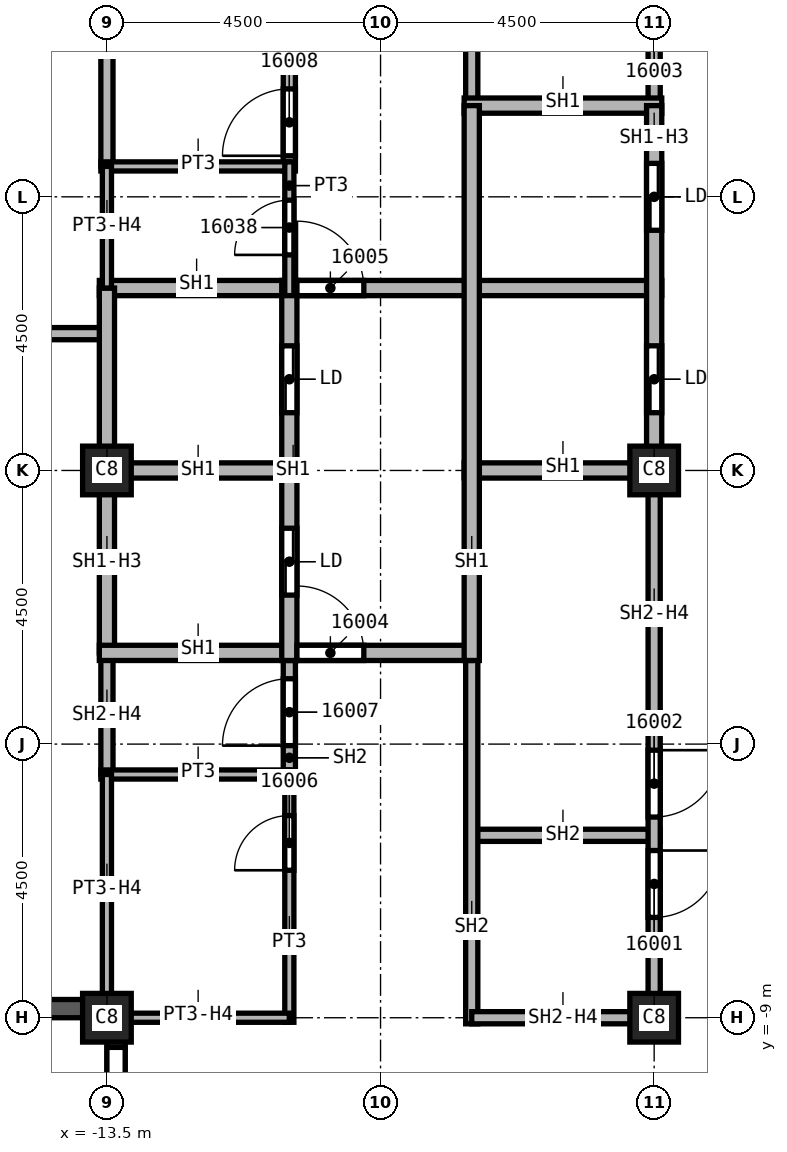
"""IFC4 building model, lengths in metres.
Left out: names, types, materials, properties, quantities, classifications, styles, units other than length and angle.
Written with IfcOpenShell. Run it as: python <this file> out.ifc"""

import sys

from ifc_helpers import new_model, si_unit, direction, frame, frame_2d, origin, origin_2d, place, context, subcontext, project, spatial, rectangle, extrude, element, fill, save


model = new_model("IFC4")
c1 = context("Model", 3, precision=1e-05, world=origin(), true_north=direction((0.0, 1.0)))
c2 = subcontext(c1, "Body", "Model", "MODEL_VIEW")
j1 = project(units=[si_unit("LENGTHUNIT", "METRE"), si_unit("PLANEANGLEUNIT", "RADIAN")], contexts=[c1])
p1 = place(None, origin())
s1 = spatial("IfcSite", under=j1, at=p1, CompositionType="ELEMENT")
p2 = place(p1, origin())
s2 = spatial("IfcBuilding", under=s1, at=p2, CompositionType="ELEMENT")
p3 = place(p2, frame((0.0, 0.0, 242.0)))
s3 = spatial("IfcBuildingStorey", under=s2, at=p3, CompositionType="ELEMENT", Elevation=242.0)
for number, where, z_axis, x_axis in (
    (1, (-4.5, 0.0, 0.0), (0.0, 0.0, 1.0), (1.0, 0.0, 0.0)),
    (2, (-4.5, -9.0, 0.0), (0.0, 0.0, 1.0), (1.0, 0.0, 0.0)),
    (3, (-13.5, 0.0, 0.0), (0.0, 0.0, 1.0), (1.0, 0.0, 0.0)),
    (4, (-13.5, -9.0, 0.0), (0.0, 0.0, 1.0), (1.0, 0.0, 0.0)),
):
    element("IfcColumn", number, at=place(p3, frame(where, z_axis=z_axis, x_axis=x_axis)), inside=s3, PredefinedType="COLUMN", context=c2, shape_type="SweptSolid", body=[
        extrude(rectangle(XDim=0.8, YDim=0.8, at=origin_2d()), origin(), (0.0, 0.0, 1.0), 3.72),
    ])
p4 = place(p3, frame((-13.35, -9.025, 0.0), z_axis=(0.0, 0.0, 1.0), x_axis=(0.0, -1.0, 0.0)))
e5 = element("IfcWall", 5, at=p4, inside=s3, PredefinedType="SOLIDWALL", context=c2, shape_type="SweptSolid", body=[
    extrude(rectangle(XDim=8.525, YDim=0.3, at=frame_2d((4.263, 0.0))), origin(), (0.0, 0.0, 1.0), 3.12),
])
p5 = place(p4, frame((0.462, 0.0, 0.8)))
e6 = element("IfcOpeningElement", 6, at=p5, cuts=e5, PredefinedType="OPENING", context=c2, shape_type="SweptSolid", body=[
    extrude(rectangle(XDim=2.4, YDim=1.95, at=frame_2d((1.2, 0.975))), frame((0.0, 0.15, 0.0), z_axis=(0.0, -1.0, 0.0), x_axis=(1.0, 0.0, 0.0)), (0.0, 0.0, 1.0), 0.3),
])
p6 = place(p4, frame((4.538, 0.0, 0.8)))
e7 = element("IfcOpeningElement", 7, at=p6, cuts=e5, PredefinedType="OPENING", context=c2, shape_type="SweptSolid", body=[
    extrude(rectangle(XDim=2.4, YDim=1.95, at=frame_2d((1.2, 0.975))), frame((0.0, 0.15, 0.0), z_axis=(0.0, -1.0, 0.0), x_axis=(1.0, 0.0, 0.0)), (0.0, 0.0, 1.0), 0.3),
])
p7 = place(p3, frame((-22.05, -8.85, 0.0), z_axis=(0.0, 0.0, 1.0), x_axis=(1.0, 0.0, 0.0)))
e8 = element("IfcWall", 8, at=p7, inside=s3, PredefinedType="SOLIDWALL", context=c2, shape_type="SweptSolid", body=[
    extrude(rectangle(XDim=8.525, YDim=0.3, at=frame_2d((4.263, 0.0))), origin(), (0.0, 0.0, 1.0), 3.12),
])
p8 = place(p7, frame((4.913, 0.0, 0.8)))
e9 = element("IfcOpeningElement", 9, at=p8, cuts=e8, PredefinedType="OPENING", context=c2, shape_type="SweptSolid", body=[
    extrude(rectangle(XDim=2.4, YDim=1.95, at=frame_2d((1.2, 0.975))), frame((0.0, 0.15, 0.0), z_axis=(0.0, -1.0, 0.0), x_axis=(1.0, 0.0, 0.0)), (0.0, 0.0, 1.0), 0.3),
])
p9 = place(p7, frame((0.894, 0.0, 0.8)))
e10 = element("IfcOpeningElement", 10, at=p9, cuts=e8, PredefinedType="OPENING", context=c2, shape_type="SweptSolid", body=[
    extrude(rectangle(XDim=1.0, YDim=1.95, at=frame_2d((0.5, 0.975))), frame((0.0, 0.15, 0.0), z_axis=(0.0, -1.0, 0.0), x_axis=(1.0, 0.0, 0.0)), (0.0, 0.0, 1.0), 0.3),
])
p10 = place(p7, frame((2.494, 0.0, 0.8)))
e11 = element("IfcOpeningElement", 11, at=p10, cuts=e8, PredefinedType="OPENING", context=c2, shape_type="SweptSolid", body=[
    extrude(rectangle(XDim=0.6, YDim=1.95, at=frame_2d((0.3, 0.975))), frame((0.0, 0.15, 0.0), z_axis=(0.0, -1.0, 0.0), x_axis=(1.0, 0.0, 0.0)), (0.0, 0.0, 1.0), 0.3),
])
p11 = place(p3, frame((-18.0, 2.25, 0.0), z_axis=(0.0, 0.0, 1.0), x_axis=(1.0, 0.0, 0.0)))
e12 = element("IfcWall", 12, at=p11, inside=s3, PredefinedType="PARTITIONING", context=c2, shape_type="SweptSolid", body=[
    extrude(rectangle(XDim=4.5, YDim=0.2, at=frame_2d((2.25, 0.0))), origin(), (0.0, 0.0, 1.0), 3.72),
])
p12 = place(p3, frame((-13.5, -5.0, 0.0), z_axis=(0.0, 0.0, 1.0), x_axis=(0.0, 1.0, 0.0)))
e13 = element("IfcWall", 13, at=p12, inside=s3, PredefinedType="SOLIDWALL", context=c2, shape_type="SweptSolid", body=[
    extrude(rectangle(XDim=2.0, YDim=0.2, at=frame_2d((1.0, 0.0))), origin(), (0.0, 0.0, 1.0), 3.042),
])
p13 = place(p3, frame((-13.5, 5.0, 0.0), z_axis=(0.0, 0.0, 1.0), x_axis=(0.0, 1.0, 0.0)))
e14 = element("IfcWall", 14, at=p13, inside=s3, PredefinedType="SOLIDWALL", context=c2, shape_type="SweptSolid", body=[
    extrude(rectangle(XDim=4.1, YDim=0.2, at=frame_2d((2.05, 0.0))), origin(), (0.0, 0.0, 1.0), 3.042),
])
p14 = place(p3, frame((-10.5, -5.075, 0.0), z_axis=(0.0, 0.0, 1.0), x_axis=(0.0, 1.0, 0.0)))
e15 = element("IfcWall", 15, at=p14, inside=s3, PredefinedType="SOLIDWALL", context=c2, shape_type="SweptSolid", body=[
    extrude(rectangle(XDim=2.2, YDim=0.2, at=frame_2d((1.1, 0.0))), origin(), (0.0, 0.0, 1.0), 3.72),
])
p15 = place(p14, frame((0.55, 0.0, 0.0)))
e16 = element("IfcOpeningElement", 16, at=p15, cuts=e15, PredefinedType="OPENING", context=c2, shape_type="SweptSolid", body=[
    extrude(rectangle(XDim=1.1, YDim=2.1, at=frame_2d((0.55, 1.05))), frame((0.0, 0.1, 0.0), z_axis=(0.0, -1.0, 0.0), x_axis=(1.0, 0.0, 0.0)), (0.0, 0.0, 1.0), 0.2),
])
p16 = place(p3, frame((-10.5, 4.925, 0.0), z_axis=(0.0, 0.0, 1.0), x_axis=(0.0, 1.0, 0.0)))
e17 = element("IfcWall", 17, at=p16, inside=s3, PredefinedType="SOLIDWALL", context=c2, shape_type="SweptSolid", body=[
    extrude(rectangle(XDim=4.175, YDim=0.2, at=frame_2d((2.087, 0.0))), origin(), (0.0, 0.0, 1.0), 3.72),
])
p17 = place(p16, frame((0.25, 0.0, 0.0)))
e18 = element("IfcOpeningElement", 18, at=p17, cuts=e17, PredefinedType="OPENING", context=c2, shape_type="SweptSolid", body=[
    extrude(rectangle(XDim=1.1, YDim=2.1, at=frame_2d((0.55, 1.05))), frame((0.0, 0.1, 0.0), z_axis=(0.0, -1.0, 0.0), x_axis=(1.0, 0.0, 0.0)), (0.0, 0.0, 1.0), 0.2),
])
p18 = place(p3, frame((-7.6, -6.0, 0.0), z_axis=(0.0, 0.0, 1.0), x_axis=(1.0, 0.0, 0.0)))
e19 = element("IfcWall", 19, at=p18, inside=s3, PredefinedType="SOLIDWALL", context=c2, shape_type="SweptSolid", body=[
    extrude(rectangle(XDim=3.2, YDim=0.2, at=frame_2d((1.6, 0.0))), origin(), (0.0, 0.0, 1.0), 3.72),
])
p19 = place(p3, frame((-7.5, -9.1, 0.0), z_axis=(0.0, 0.0, 1.0), x_axis=(0.0, 1.0, 0.0)))
e20 = element("IfcWall", 20, at=p19, inside=s3, PredefinedType="SOLIDWALL", context=c2, shape_type="SweptSolid", body=[
    extrude(rectangle(XDim=6.225, YDim=0.2, at=frame_2d((3.113, 0.0))), origin(), (0.0, 0.0, 1.0), 3.72),
])
p20 = place(p3, frame((-7.5, 6.0, 0.0), z_axis=(0.0, 0.0, 1.0), x_axis=(0.0, 1.0, 0.0)))
e21 = element("IfcWall", 21, at=p20, inside=s3, PredefinedType="SOLIDWALL", context=c2, shape_type="SweptSolid", body=[
    extrude(rectangle(XDim=3.1, YDim=0.2, at=frame_2d((1.55, 0.0))), origin(), (0.0, 0.0, 1.0), 3.72),
])
p21 = place(p3, frame((-4.5, -9.0, 0.0), z_axis=(0.0, 0.0, 1.0), x_axis=(-1.0, 0.0, 0.0)))
e22 = element("IfcWall", 22, at=p21, inside=s3, PredefinedType="SOLIDWALL", context=c2, shape_type="SweptSolid", body=[
    extrude(rectangle(XDim=3.0, YDim=0.2, at=frame_2d((1.5, 0.0))), origin(), (0.0, 0.0, 1.0), 3.042),
])
p22 = place(p3, frame((-4.5, 0.0, 0.0), z_axis=(0.0, 0.0, 1.0), x_axis=(0.0, -1.0, 0.0)))
e23 = element("IfcWall", 23, at=p22, inside=s3, PredefinedType="SOLIDWALL", context=c2, shape_type="SweptSolid", body=[
    extrude(rectangle(XDim=9.1, YDim=0.2, at=frame_2d((4.55, 0.0))), origin(), (0.0, 0.0, 1.0), 3.042),
])
p23 = place(p22, frame((6.25, 0.0, 0.0)))
e24 = element("IfcOpeningElement", 24, at=p23, cuts=e23, PredefinedType="OPENING", context=c2, shape_type="SweptSolid", body=[
    extrude(rectangle(XDim=1.1, YDim=2.1, at=frame_2d((0.55, 1.05))), frame((0.0, 0.1, 0.0), z_axis=(0.0, -1.0, 0.0), x_axis=(1.0, 0.0, 0.0)), (0.0, 0.0, 1.0), 0.2),
])
p24 = place(p22, frame((4.6, 0.0, 0.0)))
e25 = element("IfcOpeningElement", 25, at=p24, cuts=e23, PredefinedType="OPENING", context=c2, shape_type="SweptSolid", body=[
    extrude(rectangle(XDim=1.1, YDim=2.1, at=frame_2d((0.55, 1.05))), frame((0.0, 0.1, 0.0), z_axis=(0.0, -1.0, 0.0), x_axis=(1.0, 0.0, 0.0)), (0.0, 0.0, 1.0), 0.2),
])
p25 = place(p3, frame((-4.5, 9.1, 0.0), z_axis=(0.0, 0.0, 1.0), x_axis=(0.0, -1.0, 0.0)))
e26 = element("IfcWall", 26, at=p25, inside=s3, PredefinedType="SOLIDWALL", context=c2, shape_type="SweptSolid", body=[
    extrude(rectangle(XDim=3.1, YDim=0.2, at=frame_2d((1.55, 0.0))), origin(), (0.0, 0.0, 1.0), 3.042),
])
p26 = place(p25, frame((1.0, 0.0, 0.0)))
e27 = element("IfcOpeningElement", 27, at=p26, cuts=e26, PredefinedType="OPENING", context=c2, shape_type="SweptSolid", body=[
    extrude(rectangle(XDim=1.1, YDim=2.1, at=frame_2d((0.55, 1.05))), frame((0.0, 0.1, 0.0), z_axis=(0.0, -1.0, 0.0), x_axis=(1.0, 0.0, 0.0)), (0.0, 0.0, 1.0), 0.2),
])
p27 = place(p3, frame((-13.625, 0.0, 0.0), z_axis=(0.0, 0.0, 1.0), x_axis=(1.0, 0.0, 0.0)))
e28 = element("IfcWall", 28, at=p27, inside=s3, PredefinedType="SOLIDWALL", context=c2, shape_type="SweptSolid", body=[
    extrude(rectangle(XDim=3.125, YDim=0.25, at=frame_2d((1.562, 0.0))), origin(), (0.0, 0.0, 1.0), 3.72),
])
p28 = place(p3, frame((-13.625, 3.0, 0.0), z_axis=(0.0, 0.0, 1.0), x_axis=(1.0, 0.0, 0.0)))
e29 = element("IfcWall", 29, at=p28, inside=s3, PredefinedType="SOLIDWALL", context=c2, shape_type="SweptSolid", body=[
    extrude(rectangle(XDim=9.25, YDim=0.25, at=frame_2d((4.625, 0.0))), origin(), (0.0, 0.0, 1.0), 3.72),
])
p29 = place(p28, frame((3.25, 0.0, 0.0)))
e30 = element("IfcOpeningElement", 30, at=p29, cuts=e29, PredefinedType="OPENING", context=c2, shape_type="SweptSolid", body=[
    extrude(rectangle(XDim=1.1, YDim=2.1, at=frame_2d((0.55, 1.05))), frame((0.0, 0.125, 0.0), z_axis=(0.0, -1.0, 0.0), x_axis=(1.0, 0.0, 0.0)), (0.0, 0.0, 1.0), 0.25),
])
p30 = place(p3, frame((-13.5, -3.0, 0.0), z_axis=(0.0, 0.0, 1.0), x_axis=(0.0, 1.0, 0.0)))
e31 = element("IfcWall", 31, at=p30, inside=s3, PredefinedType="SOLIDWALL", context=c2, shape_type="SweptSolid", body=[
    extrude(rectangle(XDim=6.0, YDim=0.25, at=frame_2d((3.0, 0.0))), origin(), (0.0, 0.0, 1.0), 3.042),
])
p31 = place(p3, frame((-13.625, -3.0, 0.0), z_axis=(0.0, 0.0, 1.0), x_axis=(1.0, 0.0, 0.0)))
e32 = element("IfcWall", 32, at=p31, inside=s3, PredefinedType="SOLIDWALL", context=c2, shape_type="SweptSolid", body=[
    extrude(rectangle(XDim=6.125, YDim=0.25, at=frame_2d((3.062, 0.0))), origin(), (0.0, 0.0, 1.0), 3.72),
])
p32 = place(p31, frame((3.25, 0.0, 0.0)))
e33 = element("IfcOpeningElement", 33, at=p32, cuts=e32, PredefinedType="OPENING", context=c2, shape_type="SweptSolid", body=[
    extrude(rectangle(XDim=1.1, YDim=2.1, at=frame_2d((0.55, 1.05))), frame((0.0, 0.125, 0.0), z_axis=(0.0, -1.0, 0.0), x_axis=(1.0, 0.0, 0.0)), (0.0, 0.0, 1.0), 0.25),
])
p33 = place(p3, frame((-10.5, -3.125, 0.0), z_axis=(0.0, 0.0, 1.0), x_axis=(0.0, 1.0, 0.0)))
e34 = element("IfcWall", 34, at=p33, inside=s3, PredefinedType="SOLIDWALL", context=c2, shape_type="SweptSolid", body=[
    extrude(rectangle(XDim=6.25, YDim=0.25, at=frame_2d((3.125, 0.0))), origin(), (0.0, 0.0, 1.0), 3.72),
])
p34 = place(p33, frame((1.075, 0.0, 0.0)))
e35 = element("IfcOpeningElement", 35, at=p34, cuts=e34, PredefinedType="OPENING", context=c2, shape_type="SweptSolid", body=[
    extrude(rectangle(XDim=1.1, YDim=2.1, at=frame_2d((0.55, 1.05))), frame((0.0, 0.125, 0.0), z_axis=(0.0, -1.0, 0.0), x_axis=(1.0, 0.0, 0.0)), (0.0, 0.0, 1.0), 0.25),
])
p35 = place(p33, frame((4.075, 0.0, 0.0)))
e36 = element("IfcOpeningElement", 36, at=p35, cuts=e34, PredefinedType="OPENING", context=c2, shape_type="SweptSolid", body=[
    extrude(rectangle(XDim=1.1, YDim=2.1, at=frame_2d((0.55, 1.05))), frame((0.0, 0.125, 0.0), z_axis=(0.0, -1.0, 0.0), x_axis=(1.0, 0.0, 0.0)), (0.0, 0.0, 1.0), 0.25),
])
for number, where, z_axis, x_axis in (
    (37, (-7.625, 0.0, 0.0), (0.0, 0.0, 1.0), (1.0, 0.0, 0.0)),
    (38, (-7.625, 6.0, 0.0), (0.0, 0.0, 1.0), (1.0, 0.0, 0.0)),
):
    element("IfcWall", number, at=place(p3, frame(where, z_axis=z_axis, x_axis=x_axis)), inside=s3, PredefinedType="SOLIDWALL", context=c2, shape_type="SweptSolid", body=[
        extrude(rectangle(XDim=3.25, YDim=0.25, at=frame_2d((1.625, 0.0))), origin(), (0.0, 0.0, 1.0), 3.72),
    ])
p36 = place(p3, frame((-7.5, -3.125, 0.0), z_axis=(0.0, 0.0, 1.0), x_axis=(0.0, 1.0, 0.0)))
e39 = element("IfcWall", 39, at=p36, inside=s3, PredefinedType="SOLIDWALL", context=c2, shape_type="SweptSolid", body=[
    extrude(rectangle(XDim=9.125, YDim=0.25, at=frame_2d((4.562, 0.0))), origin(), (0.0, 0.0, 1.0), 3.72),
])
p37 = place(p3, frame((-4.5, 6.0, 0.0), z_axis=(0.0, 0.0, 1.0), x_axis=(0.0, -1.0, 0.0)))
e40 = element("IfcWall", 40, at=p37, inside=s3, PredefinedType="SOLIDWALL", context=c2, shape_type="SweptSolid", body=[
    extrude(rectangle(XDim=6.0, YDim=0.25, at=frame_2d((3.0, 0.0))), origin(), (0.0, 0.0, 1.0), 3.042),
])
p38 = place(p37, frame((3.95, 0.0, 0.0)))
e41 = element("IfcOpeningElement", 41, at=p38, cuts=e40, PredefinedType="OPENING", context=c2, shape_type="SweptSolid", body=[
    extrude(rectangle(XDim=1.1, YDim=2.1, at=frame_2d((0.55, 1.05))), frame((0.0, 0.125, 0.0), z_axis=(0.0, -1.0, 0.0), x_axis=(1.0, 0.0, 0.0)), (0.0, 0.0, 1.0), 0.25),
])
p39 = place(p37, frame((0.95, 0.0, 0.0)))
e42 = element("IfcOpeningElement", 42, at=p39, cuts=e40, PredefinedType="OPENING", context=c2, shape_type="SweptSolid", body=[
    extrude(rectangle(XDim=1.1, YDim=2.1, at=frame_2d((0.55, 1.05))), frame((0.0, 0.125, 0.0), z_axis=(0.0, -1.0, 0.0), x_axis=(1.0, 0.0, 0.0)), (0.0, 0.0, 1.0), 0.25),
])
for number, where, z_axis, x_axis in (
    (43, (-13.6, -5.0, 0.0), (0.0, 0.0, 1.0), (1.0, 0.0, 0.0)),
    (44, (-13.6, 5.0, 0.0), (0.0, 0.0, 1.0), (1.0, 0.0, 0.0)),
):
    element("IfcWall", number, at=place(p3, frame(where, z_axis=z_axis, x_axis=x_axis)), inside=s3, PredefinedType="PARTITIONING", context=c2, shape_type="SweptSolid", body=[
        extrude(rectangle(XDim=3.1, YDim=0.15, at=frame_2d((1.55, 0.0))), origin(), (0.0, 0.0, 1.0), 3.72),
    ])
p40 = place(p3, frame((-13.5, -9.0, 0.0), z_axis=(0.0, 0.0, 1.0), x_axis=(0.0, 1.0, 0.0)))
e45 = element("IfcWall", 45, at=p40, inside=s3, PredefinedType="PARTITIONING", context=c2, shape_type="SweptSolid", body=[
    extrude(rectangle(XDim=4.0, YDim=0.15, at=frame_2d((2.0, 0.0))), origin(), (0.0, 0.0, 1.0), 3.042),
])
p41 = place(p3, frame((-13.5, 3.0, 0.0), z_axis=(0.0, 0.0, 1.0), x_axis=(0.0, 1.0, 0.0)))
e46 = element("IfcWall", 46, at=p41, inside=s3, PredefinedType="PARTITIONING", context=c2, shape_type="SweptSolid", body=[
    extrude(rectangle(XDim=2.0, YDim=0.15, at=frame_2d((1.0, 0.0))), origin(), (0.0, 0.0, 1.0), 3.042),
])
p42 = place(p3, frame((-10.5, -9.075, 0.0), z_axis=(0.0, 0.0, 1.0), x_axis=(0.0, 1.0, 0.0)))
e47 = element("IfcWall", 47, at=p42, inside=s3, PredefinedType="PARTITIONING", context=c2, shape_type="SweptSolid", body=[
    extrude(rectangle(XDim=4.15, YDim=0.15, at=frame_2d((2.075, 0.0))), origin(), (0.0, 0.0, 1.0), 3.72),
])
p43 = place(p42, frame((2.5, 0.0, 0.0)))
e48 = element("IfcOpeningElement", 48, at=p43, cuts=e47, PredefinedType="OPENING", context=c2, shape_type="SweptSolid", body=[
    extrude(rectangle(XDim=0.9, YDim=2.1, at=frame_2d((0.45, 1.05))), frame((0.0, 0.075, 0.0), z_axis=(0.0, -1.0, 0.0), x_axis=(1.0, 0.0, 0.0)), (0.0, 0.0, 1.0), 0.15),
])
p44 = place(p3, frame((-10.5, -9.0, 0.0), z_axis=(0.0, 0.0, 1.0), x_axis=(-1.0, 0.0, 0.0)))
e49 = element("IfcWall", 49, at=p44, inside=s3, PredefinedType="PARTITIONING", context=c2, shape_type="SweptSolid", body=[
    extrude(rectangle(XDim=3.025, YDim=0.15, at=frame_2d((1.512, 0.0))), origin(), (0.0, 0.0, 1.0), 3.042),
])
p45 = place(p3, frame((-10.5, 2.875, 0.0), z_axis=(0.0, 0.0, 1.0), x_axis=(0.0, 1.0, 0.0)))
e50 = element("IfcWall", 50, at=p45, inside=s3, PredefinedType="PARTITIONING", context=c2, shape_type="SweptSolid", body=[
    extrude(rectangle(XDim=2.2, YDim=0.15, at=frame_2d((1.1, 0.0))), origin(), (0.0, 0.0, 1.0), 3.72),
])
p46 = place(p45, frame((0.67, 0.0, 0.0)))
e51 = element("IfcOpeningElement", 51, at=p46, cuts=e50, PredefinedType="OPENING", context=c2, shape_type="SweptSolid", body=[
    extrude(rectangle(XDim=0.9, YDim=2.1, at=frame_2d((0.45, 1.05))), frame((0.0, 0.075, 0.0), z_axis=(0.0, -1.0, 0.0), x_axis=(1.0, 0.0, 0.0)), (0.0, 0.0, 1.0), 0.15),
])
p47 = place(p5, origin())
e52 = element("IfcWindow", 52, at=p47, inside=s3, PartitioningType="SINGLE_PANEL", PredefinedType="WINDOW", context=c2, shape_type="SweptSolid", body=[
    extrude(rectangle(XDim=2.4, YDim=1.95, at=frame_2d((1.2, 0.975))), frame((0.0, 0.03, 0.0), z_axis=(0.0, -1.0, 0.0), x_axis=(1.0, 0.0, 0.0)), (0.0, 0.0, 1.0), 0.06),
])
fill(e6, e52)
p48 = place(p23, origin())
e53 = element("IfcDoor", 53, at=p48, inside=s3, OperationType="SINGLE_SWING_RIGHT", PredefinedType="DOOR", context=c2, shape_type="SweptSolid", body=[
    extrude(rectangle(XDim=1.1, YDim=2.1, at=frame_2d((0.55, 1.05))), frame((0.0, 0.025, 0.0), z_axis=(0.0, -1.0, 0.0), x_axis=(1.0, 0.0, 0.0)), (0.0, 0.0, 1.0), 0.05),
])
fill(e24, e53)
p49 = place(p24, origin())
e54 = element("IfcDoor", 54, at=p49, inside=s3, OperationType="SINGLE_SWING_LEFT", PredefinedType="DOOR", context=c2, shape_type="SweptSolid", body=[
    extrude(rectangle(XDim=1.1, YDim=2.1, at=frame_2d((0.55, 1.05))), frame((0.0, 0.025, 0.0), z_axis=(0.0, -1.0, 0.0), x_axis=(1.0, 0.0, 0.0)), (0.0, 0.0, 1.0), 0.05),
])
fill(e25, e54)
p50 = place(p32, origin())
e55 = element("IfcDoor", 55, at=p50, inside=s3, OperationType="SINGLE_SWING_LEFT", PredefinedType="DOOR", context=c2, shape_type="SweptSolid", body=[
    extrude(rectangle(XDim=1.1, YDim=2.1, at=frame_2d((0.55, 1.05))), frame((0.0, 0.025, 0.0), z_axis=(0.0, -1.0, 0.0), x_axis=(1.0, 0.0, 0.0)), (0.0, 0.0, 1.0), 0.05),
])
fill(e33, e55)
p51 = place(p29, origin())
e56 = element("IfcDoor", 56, at=p51, inside=s3, OperationType="SINGLE_SWING_RIGHT", PredefinedType="DOOR", context=c2, shape_type="SweptSolid", body=[
    extrude(rectangle(XDim=1.1, YDim=2.1, at=frame_2d((0.55, 1.05))), frame((0.0, 0.025, 0.0), z_axis=(0.0, -1.0, 0.0), x_axis=(1.0, 0.0, 0.0)), (0.0, 0.0, 1.0), 0.05),
])
fill(e30, e56)
p52 = place(p43, origin())
e57 = element("IfcDoor", 57, at=p52, inside=s3, OperationType="SINGLE_SWING_LEFT", PredefinedType="DOOR", context=c2, shape_type="SweptSolid", body=[
    extrude(rectangle(XDim=0.9, YDim=2.1, at=frame_2d((0.45, 1.05))), frame((0.0, 0.025, 0.0), z_axis=(0.0, -1.0, 0.0), x_axis=(1.0, 0.0, 0.0)), (0.0, 0.0, 1.0), 0.05),
])
fill(e48, e57)
p53 = place(p15, origin())
e58 = element("IfcDoor", 58, at=p53, inside=s3, OperationType="SINGLE_SWING_RIGHT", PredefinedType="DOOR", context=c2, shape_type="SweptSolid", body=[
    extrude(rectangle(XDim=1.1, YDim=2.1, at=frame_2d((0.55, 1.05))), frame((0.0, 0.025, 0.0), z_axis=(0.0, -1.0, 0.0), x_axis=(1.0, 0.0, 0.0)), (0.0, 0.0, 1.0), 0.05),
])
fill(e16, e58)
p54 = place(p17, origin())
e59 = element("IfcDoor", 59, at=p54, inside=s3, OperationType="SINGLE_SWING_LEFT", PredefinedType="DOOR", context=c2, shape_type="SweptSolid", body=[
    extrude(rectangle(XDim=1.1, YDim=2.1, at=frame_2d((0.55, 1.05))), frame((0.0, 0.025, 0.0), z_axis=(0.0, -1.0, 0.0), x_axis=(1.0, 0.0, 0.0)), (0.0, 0.0, 1.0), 0.05),
])
fill(e18, e59)
p55 = place(p46, origin())
e60 = element("IfcDoor", 60, at=p55, inside=s3, OperationType="SINGLE_SWING_LEFT", PredefinedType="DOOR", context=c2, shape_type="SweptSolid", body=[
    extrude(rectangle(XDim=0.9, YDim=2.1, at=frame_2d((0.45, 1.05))), frame((0.0, 0.025, 0.0), z_axis=(0.0, -1.0, 0.0), x_axis=(1.0, 0.0, 0.0)), (0.0, 0.0, 1.0), 0.05),
])
fill(e51, e60)
p56 = place(p38, origin())
e61 = element("IfcDoor", 61, at=p56, inside=s3, OperationType="SLIDING_TO_LEFT", PredefinedType="DOOR", context=c2, shape_type="SweptSolid", body=[
    extrude(rectangle(XDim=1.1, YDim=2.1, at=frame_2d((0.55, 1.05))), frame((0.0, 0.025, 0.0), z_axis=(0.0, -1.0, 0.0), x_axis=(1.0, 0.0, 0.0)), (0.0, 0.0, 1.0), 0.05),
])
fill(e41, e61)
p57 = place(p39, origin())
e62 = element("IfcDoor", 62, at=p57, inside=s3, OperationType="SLIDING_TO_LEFT", PredefinedType="DOOR", context=c2, shape_type="SweptSolid", body=[
    extrude(rectangle(XDim=1.1, YDim=2.1, at=frame_2d((0.55, 1.05))), frame((0.0, 0.025, 0.0), z_axis=(0.0, -1.0, 0.0), x_axis=(1.0, 0.0, 0.0)), (0.0, 0.0, 1.0), 0.05),
])
fill(e42, e62)
p58 = place(p34, origin())
e63 = element("IfcDoor", 63, at=p58, inside=s3, OperationType="SLIDING_TO_LEFT", PredefinedType="DOOR", context=c2, shape_type="SweptSolid", body=[
    extrude(rectangle(XDim=1.1, YDim=2.1, at=frame_2d((0.55, 1.05))), frame((0.0, 0.025, 0.0), z_axis=(0.0, -1.0, 0.0), x_axis=(1.0, 0.0, 0.0)), (0.0, 0.0, 1.0), 0.05),
])
fill(e35, e63)
p59 = place(p35, origin())
e64 = element("IfcDoor", 64, at=p59, inside=s3, OperationType="SLIDING_TO_LEFT", PredefinedType="DOOR", context=c2, shape_type="SweptSolid", body=[
    extrude(rectangle(XDim=1.1, YDim=2.1, at=frame_2d((0.55, 1.05))), frame((0.0, 0.025, 0.0), z_axis=(0.0, -1.0, 0.0), x_axis=(1.0, 0.0, 0.0)), (0.0, 0.0, 1.0), 0.05),
])
fill(e36, e64)
save(model, sys.argv[1])
